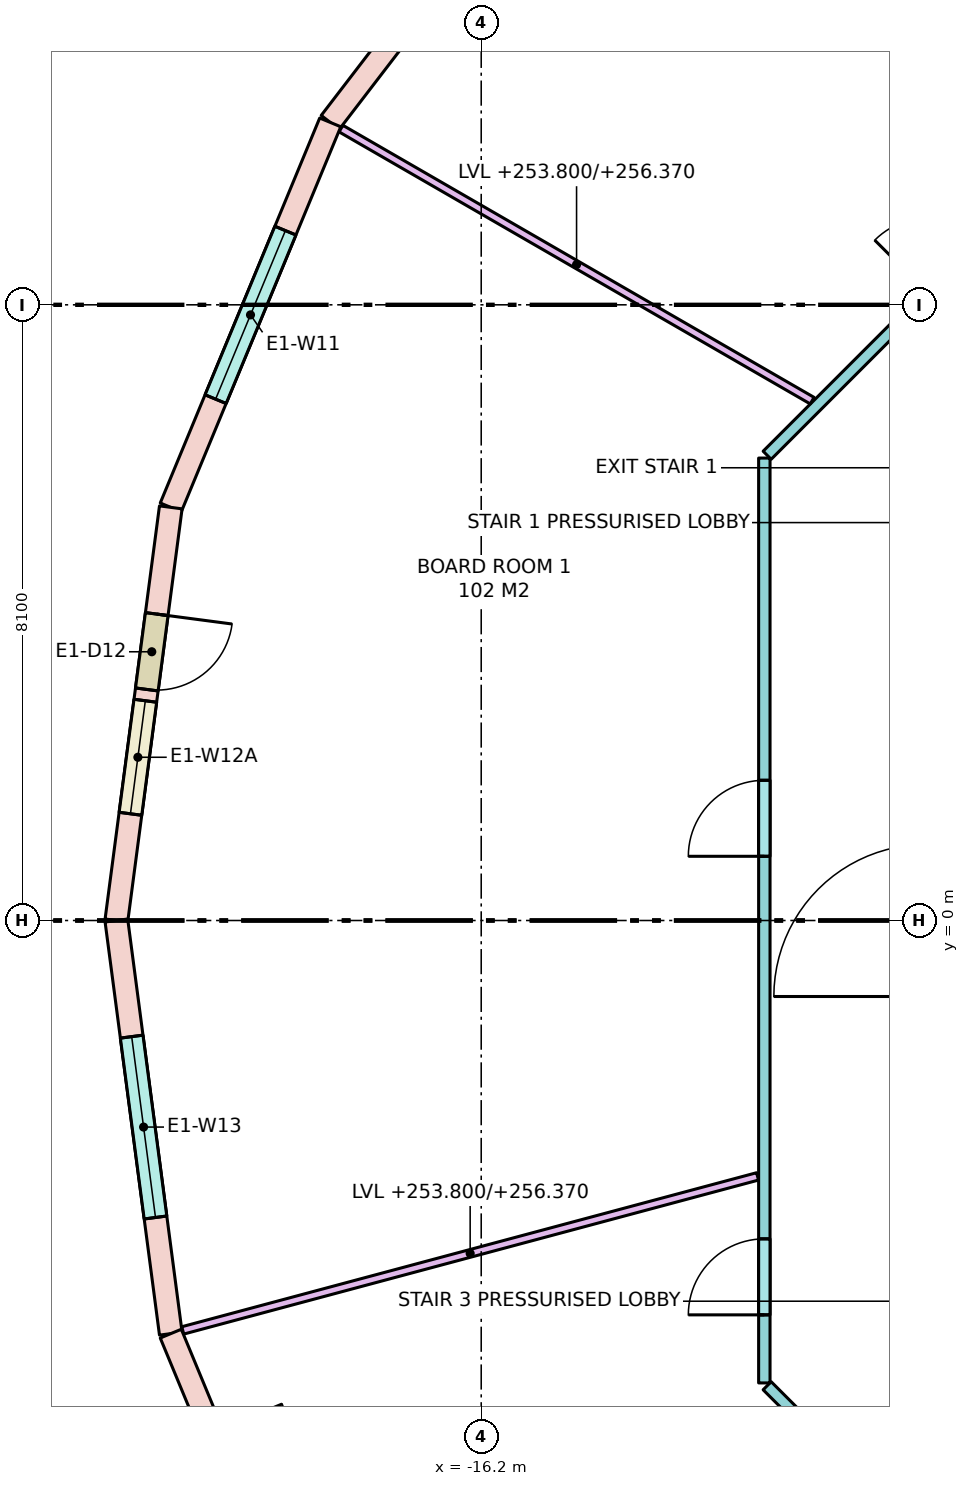
"""IFC4 building model, lengths in metres.
Left out: names, types, materials, properties, quantities, classifications, styles, units other than length and angle.
Written with IfcOpenShell. Run it as: python <this file> out.ifc"""

import sys

from ifc_helpers import new_model, si_unit, direction, frame, frame_2d, origin, place, context, subcontext, project, spatial, rectangle, extrude, element, fill, save


model = new_model("IFC4")
c1 = context("Model", 3, precision=1e-05, world=origin(), true_north=direction((0.0, 1.0)))
c2 = subcontext(c1, "Body", "Model", "MODEL_VIEW")
j1 = project(units=[si_unit("LENGTHUNIT", "METRE"), si_unit("PLANEANGLEUNIT", "RADIAN")], contexts=[c1])
p1 = place(None, origin())
s1 = spatial("IfcSite", under=j1, at=p1, CompositionType="ELEMENT")
p2 = place(p1, origin())
s2 = spatial("IfcBuilding", under=s1, at=p2, CompositionType="ELEMENT")
p3 = place(p2, frame((0.0, 0.0, 253.8)))
s3 = spatial("IfcBuildingStorey", under=s2, at=p3, CompositionType="ELEMENT", Elevation=253.8)
p4 = place(p3, frame((-14.849, 14.849, 0.0), z_axis=(0.0, 0.0, 1.0), x_axis=(-0.608784891166, -0.793335336593, 0.0)))
e1 = element("IfcWall", 1, at=p4, inside=s3, PredefinedType="STANDARD", context=c2, shape_type="SweptSolid", body=[
    extrude(rectangle(XDim=5.482, YDim=0.3, at=frame_2d((2.741, 0.0))), origin(), (0.0, 0.0, 1.0), 3.42),
])
p5 = place(p4, frame((1.416, 0.0, 0.0)))
e2 = element("IfcOpeningElement", 2, at=p5, cuts=e1, PredefinedType="OPENING", context=c2, shape_type="SweptSolid", body=[
    extrude(rectangle(XDim=1.0, YDim=2.4, at=frame_2d((0.5, 1.2))), frame((0.0, 0.16, 0.0), z_axis=(0.0, -1.0, 0.0), x_axis=(1.0, 0.0, 0.0)), (0.0, 0.0, 1.0), 0.32),
])
p6 = place(p4, frame((2.566, 0.0, 0.8)))
e3 = element("IfcOpeningElement", 3, at=p6, cuts=e1, PredefinedType="OPENING", context=c2, shape_type="SweptSolid", body=[
    extrude(rectangle(XDim=1.5, YDim=2.4, at=frame_2d((0.75, 1.2))), frame((0.0, 0.16, 0.0), z_axis=(0.0, -1.0, 0.0), x_axis=(1.0, 0.0, 0.0)), (0.0, 0.0, 1.0), 0.32),
])
p7 = place(p3, frame((-18.187, 10.5, 0.0), z_axis=(0.0, 0.0, 1.0), x_axis=(-0.382688740813, -0.923877333662, 0.0)))
e4 = element("IfcWall", 4, at=p7, inside=s3, PredefinedType="STANDARD", context=c2, shape_type="SweptSolid", body=[
    extrude(rectangle(XDim=5.482, YDim=0.3, at=frame_2d((2.741, 0.0))), origin(), (0.0, 0.0, 1.0), 3.42),
])
p8 = place(p7, frame((1.541, 0.0, 0.8)))
e5 = element("IfcOpeningElement", 5, at=p8, cuts=e4, PredefinedType="OPENING", context=c2, shape_type="SweptSolid", body=[
    extrude(rectangle(XDim=2.4, YDim=2.4, at=frame_2d((1.2, 1.2))), frame((0.0, 0.16, 0.0), z_axis=(0.0, -1.0, 0.0), x_axis=(1.0, 0.0, 0.0)), (0.0, 0.0, 1.0), 0.32),
])
p9 = place(p3, frame((-20.284, 5.435, 0.0), z_axis=(0.0, 0.0, 1.0), x_axis=(-0.130527087244, -0.991444743541, 0.0)))
e6 = element("IfcWall", 6, at=p9, inside=s3, PredefinedType="STANDARD", context=c2, shape_type="SweptSolid", body=[
    extrude(rectangle(XDim=5.482, YDim=0.3, at=frame_2d((2.741, 0.0))), origin(), (0.0, 0.0, 1.0), 3.42),
])
p10 = place(p9, frame((1.416, 0.0, 0.0)))
e7 = element("IfcOpeningElement", 7, at=p10, cuts=e6, PredefinedType="OPENING", context=c2, shape_type="SweptSolid", body=[
    extrude(rectangle(XDim=1.0, YDim=2.4, at=frame_2d((0.5, 1.2))), frame((0.0, 0.16, 0.0), z_axis=(0.0, -1.0, 0.0), x_axis=(1.0, 0.0, 0.0)), (0.0, 0.0, 1.0), 0.32),
])
p11 = place(p9, frame((2.566, 0.0, 0.8)))
e8 = element("IfcOpeningElement", 8, at=p11, cuts=e6, PredefinedType="OPENING", context=c2, shape_type="SweptSolid", body=[
    extrude(rectangle(XDim=1.5, YDim=2.4, at=frame_2d((0.75, 1.2))), frame((0.0, 0.16, 0.0), z_axis=(0.0, -1.0, 0.0), x_axis=(1.0, 0.0, 0.0)), (0.0, 0.0, 1.0), 0.32),
])
p12 = place(p3, frame((-21.0, 0.0, 0.0), z_axis=(0.0, 0.0, 1.0), x_axis=(0.130527087244, -0.991444743541, 0.0)))
e9 = element("IfcWall", 9, at=p12, inside=s3, PredefinedType="STANDARD", context=c2, shape_type="SweptSolid", body=[
    extrude(rectangle(XDim=5.482, YDim=0.3, at=frame_2d((2.741, 0.0))), origin(), (0.0, 0.0, 1.0), 3.42),
])
p13 = place(p12, frame((1.541, 0.0, 0.8)))
e10 = element("IfcOpeningElement", 10, at=p13, cuts=e9, PredefinedType="OPENING", context=c2, shape_type="SweptSolid", body=[
    extrude(rectangle(XDim=2.4, YDim=2.4, at=frame_2d((1.2, 1.2))), frame((0.0, 0.16, 0.0), z_axis=(0.0, -1.0, 0.0), x_axis=(1.0, 0.0, 0.0)), (0.0, 0.0, 1.0), 0.32),
])
p14 = place(p3, frame((-20.284, -5.435, 0.0), z_axis=(0.0, 0.0, 1.0), x_axis=(0.382688740813, -0.923877333662, 0.0)))
e11 = element("IfcWall", 11, at=p14, inside=s3, PredefinedType="STANDARD", context=c2, shape_type="SweptSolid", body=[
    extrude(rectangle(XDim=5.482, YDim=0.3, at=frame_2d((2.741, 0.0))), origin(), (0.0, 0.0, 1.0), 3.42),
])
p15 = place(p14, frame((1.416, 0.0, 0.0)))
e12 = element("IfcOpeningElement", 12, at=p15, cuts=e11, PredefinedType="OPENING", context=c2, shape_type="SweptSolid", body=[
    extrude(rectangle(XDim=1.0, YDim=2.4, at=frame_2d((0.5, 1.2))), frame((0.0, 0.16, 0.0), z_axis=(0.0, -1.0, 0.0), x_axis=(1.0, 0.0, 0.0)), (0.0, 0.0, 1.0), 0.32),
])
p16 = place(p14, frame((2.566, 0.0, 0.8)))
e13 = element("IfcOpeningElement", 13, at=p16, cuts=e11, PredefinedType="OPENING", context=c2, shape_type="SweptSolid", body=[
    extrude(rectangle(XDim=1.5, YDim=2.4, at=frame_2d((0.75, 1.2))), frame((0.0, 0.16, 0.0), z_axis=(0.0, -1.0, 0.0), x_axis=(1.0, 0.0, 0.0)), (0.0, 0.0, 1.0), 0.32),
])
p17 = place(p3, frame((-8.121, -10.438, 0.0), z_axis=(0.0, 0.0, 1.0), x_axis=(-0.707106781187, 0.707106781187, 0.0)))
e14 = element("IfcWall", 14, at=p17, inside=s3, PredefinedType="PARTITIONING", context=c2, shape_type="SweptSolid", body=[
    extrude(rectangle(XDim=6.105, YDim=0.15, at=frame_2d((3.053, 0.0))), origin(), (0.0, 0.0, 1.0), 2.57),
])
p18 = place(p17, frame((2.897, 0.0, 0.0)))
e15 = element("IfcOpeningElement", 15, at=p18, cuts=e14, PredefinedType="OPENING", context=c2, shape_type="SweptSolid", body=[
    extrude(rectangle(XDim=1.0, YDim=2.1, at=frame_2d((0.5, 1.05))), frame((0.0, 0.085, 0.0), z_axis=(0.0, -1.0, 0.0), x_axis=(1.0, 0.0, 0.0)), (0.0, 0.0, 1.0), 0.17),
])
p19 = place(p17, frame((0.344, 0.0, 0.0)))
e16 = element("IfcOpeningElement", 16, at=p19, cuts=e14, PredefinedType="OPENING", context=c2, shape_type="SweptSolid", body=[
    extrude(rectangle(XDim=1.0, YDim=2.1, at=frame_2d((0.5, 1.05))), frame((0.0, 0.085, 0.0), z_axis=(0.0, -1.0, 0.0), x_axis=(1.0, 0.0, 0.0)), (0.0, 0.0, 1.0), 0.17),
])
p20 = place(p3, frame((-12.475, -6.084, 0.0), z_axis=(0.0, 0.0, 1.0), x_axis=(0.0, 1.0, 0.0)))
e17 = element("IfcWall", 17, at=p20, inside=s3, PredefinedType="PARTITIONING", context=c2, shape_type="SweptSolid", body=[
    extrude(rectangle(XDim=12.167, YDim=0.15, at=frame_2d((6.084, 0.0))), origin(), (0.0, 0.0, 1.0), 2.57),
])
p21 = place(p20, frame((6.928, 0.0, 0.0)))
e18 = element("IfcOpeningElement", 18, at=p21, cuts=e17, PredefinedType="OPENING", context=c2, shape_type="SweptSolid", body=[
    extrude(rectangle(XDim=1.0, YDim=2.1, at=frame_2d((0.5, 1.05))), frame((0.0, 0.085, 0.0), z_axis=(0.0, -1.0, 0.0), x_axis=(1.0, 0.0, 0.0)), (0.0, 0.0, 1.0), 0.17),
])
p22 = place(p20, frame((0.896, 0.0, 0.0)))
e19 = element("IfcOpeningElement", 19, at=p22, cuts=e17, PredefinedType="OPENING", context=c2, shape_type="SweptSolid", body=[
    extrude(rectangle(XDim=1.0, YDim=2.1, at=frame_2d((0.5, 1.05))), frame((0.0, 0.085, 0.0), z_axis=(0.0, -1.0, 0.0), x_axis=(1.0, 0.0, 0.0)), (0.0, 0.0, 1.0), 0.17),
])
p23 = place(p3, frame((-12.438, 6.121, 0.0), z_axis=(0.0, 0.0, 1.0), x_axis=(0.707106781187, 0.707106781187, 0.0)))
e20 = element("IfcWall", 20, at=p23, inside=s3, PredefinedType="PARTITIONING", context=c2, shape_type="SweptSolid", body=[
    extrude(rectangle(XDim=6.105, YDim=0.15, at=frame_2d((3.053, 0.0))), origin(), (0.0, 0.0, 1.0), 2.57),
])
p24 = place(p23, frame((3.002, 0.0, 0.0)))
e21 = element("IfcOpeningElement", 21, at=p24, cuts=e20, PredefinedType="OPENING", context=c2, shape_type="SweptSolid", body=[
    extrude(rectangle(XDim=1.0, YDim=2.1, at=frame_2d((0.5, 1.05))), frame((0.0, 0.085, 0.0), z_axis=(0.0, -1.0, 0.0), x_axis=(1.0, 0.0, 0.0)), (0.0, 0.0, 1.0), 0.17),
])
p25 = place(p3, frame((-11.846, 6.839, 0.0), z_axis=(0.0, 0.0, 1.0), x_axis=(-0.866011787705, 0.500023583, 0.0)))
e22 = element("IfcWall", 22, at=p25, inside=s3, PredefinedType="PARTITIONING", context=c2, shape_type="SweptSolid", body=[
    extrude(rectangle(XDim=7.158, YDim=0.1, at=frame_2d((3.579, 0.0))), origin(), (0.0, 0.0, 1.0), 2.57),
])
p26 = place(p3, frame((-12.564, -3.367, 0.0), z_axis=(0.0, 0.0, 1.0), x_axis=(-0.965933576344, -0.258790119773, 0.0)))
e23 = element("IfcWall", 23, at=p26, inside=s3, PredefinedType="PARTITIONING", context=c2, shape_type="SweptSolid", body=[
    extrude(rectangle(XDim=7.829, YDim=0.1, at=frame_2d((3.915, 0.0))), origin(), (0.0, 0.0, 1.0), 2.57),
])
p27 = place(p8, origin())
e24 = element("IfcWindow", 24, at=p27, inside=s3, PartitioningType="SINGLE_PANEL", PredefinedType="WINDOW", context=c2, shape_type="SweptSolid", body=[
    extrude(rectangle(XDim=2.4, YDim=2.4, at=frame_2d((1.2, 1.2))), frame((0.0, 0.03, 0.0), z_axis=(0.0, -1.0, 0.0), x_axis=(1.0, 0.0, 0.0)), (0.0, 0.0, 1.0), 0.06),
])
fill(e5, e24)
p28 = place(p10, origin())
e25 = element("IfcDoor", 25, at=p28, inside=s3, OperationType="SINGLE_SWING_LEFT", PredefinedType="DOOR", context=c2, shape_type="SweptSolid", body=[
    extrude(rectangle(XDim=1.0, YDim=2.4, at=frame_2d((0.5, 1.2))), frame((0.0, 0.025, 0.0), z_axis=(0.0, -1.0, 0.0), x_axis=(1.0, 0.0, 0.0)), (0.0, 0.0, 1.0), 0.05),
])
fill(e7, e25)
p29 = place(p11, origin())
e26 = element("IfcWindow", 26, at=p29, inside=s3, PartitioningType="SINGLE_PANEL", PredefinedType="WINDOW", context=c2, shape_type="SweptSolid", body=[
    extrude(rectangle(XDim=1.5, YDim=2.4, at=frame_2d((0.75, 1.2))), frame((0.0, 0.03, 0.0), z_axis=(0.0, -1.0, 0.0), x_axis=(1.0, 0.0, 0.0)), (0.0, 0.0, 1.0), 0.06),
])
fill(e8, e26)
p30 = place(p13, origin())
e27 = element("IfcWindow", 27, at=p30, inside=s3, PartitioningType="SINGLE_PANEL", PredefinedType="WINDOW", context=c2, shape_type="SweptSolid", body=[
    extrude(rectangle(XDim=2.4, YDim=2.4, at=frame_2d((1.2, 1.2))), frame((0.0, 0.03, 0.0), z_axis=(0.0, -1.0, 0.0), x_axis=(1.0, 0.0, 0.0)), (0.0, 0.0, 1.0), 0.06),
])
fill(e10, e27)
p31 = place(p21, origin())
e28 = element("IfcDoor", 28, at=p31, inside=s3, OperationType="SINGLE_SWING_LEFT", PredefinedType="DOOR", context=c2, shape_type="SweptSolid", body=[
    extrude(rectangle(XDim=1.0, YDim=2.1, at=frame_2d((0.5, 1.05))), frame((0.0, 0.025, 0.0), z_axis=(0.0, -1.0, 0.0), x_axis=(1.0, 0.0, 0.0)), (0.0, 0.0, 1.0), 0.05),
])
fill(e18, e28)
p32 = place(p22, origin())
e29 = element("IfcDoor", 29, at=p32, inside=s3, OperationType="SINGLE_SWING_LEFT", PredefinedType="DOOR", context=c2, shape_type="SweptSolid", body=[
    extrude(rectangle(XDim=1.0, YDim=2.1, at=frame_2d((0.5, 1.05))), frame((0.0, 0.025, 0.0), z_axis=(0.0, -1.0, 0.0), x_axis=(1.0, 0.0, 0.0)), (0.0, 0.0, 1.0), 0.05),
])
fill(e19, e29)
save(model, sys.argv[1])
